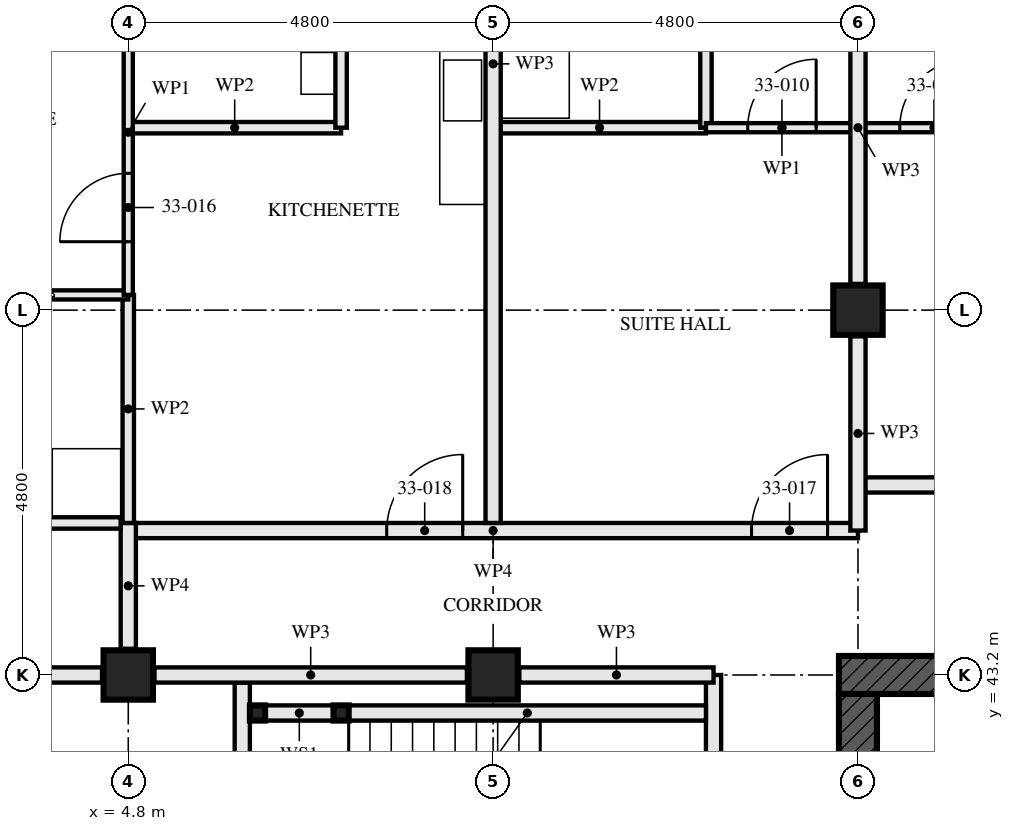
"""IFC4 building model, lengths in metres.
Left out: names, types, materials, properties, quantities, classifications, styles, units other than length and angle.
Written with IfcOpenShell. Run it as: python <this file> out.ifc"""

import sys

from ifc_helpers import new_model, si_unit, direction, frame, frame_2d, origin, origin_2d, place, context, subcontext, project, spatial, rectangle, hollow_rectangle, extrude, element, fill, save


model = new_model("IFC4")
c1 = context("Model", 3, precision=1e-05, world=origin(), true_north=direction((0.0, 1.0)))
c2 = subcontext(c1, "Body", "Model", "MODEL_VIEW")
j1 = project(units=[si_unit("LENGTHUNIT", "METRE"), si_unit("PLANEANGLEUNIT", "RADIAN")], contexts=[c1])
p1 = place(None, origin())
s1 = spatial("IfcSite", under=j1, at=p1, CompositionType="ELEMENT")
p2 = place(p1, origin())
s2 = spatial("IfcBuilding", under=s1, at=p2, CompositionType="ELEMENT")
p3 = place(p2, frame((0.0, 0.0, 122.5)))
s3 = spatial("IfcBuildingStorey", under=s2, at=p3, CompositionType="ELEMENT", Elevation=122.5)
for number, where, z_axis, x_axis in (
    (1, (4.8, 43.2, 0.0), (0.0, 0.0, 1.0), (0.0, 1.0, 0.0)),
    (2, (9.6, 43.2, 0.0), (0.0, 0.0, 1.0), (0.0, 1.0, 0.0)),
    (3, (14.4, 48.0, 0.0), (0.0, 0.0, 1.0), (1.0, 0.0, 0.0)),
):
    element("IfcColumn", number, at=place(p3, frame(where, z_axis=z_axis, x_axis=x_axis)), inside=s3, PredefinedType="COLUMN", context=c2, shape_type="SweptSolid", body=[
        extrude(hollow_rectangle(XDim=0.65, YDim=0.65, WallThickness=0.05, at=origin_2d()), origin(), (0.0, 0.0, 1.0), 3.5),
    ])
p4 = place(p3, frame((29.05, 43.2, -0.17), z_axis=(0.0, 0.0, 1.0), x_axis=(-1.0, 0.0, 0.0)))
e4 = element("IfcWall", 4, at=p4, inside=s3, PredefinedType="SHEAR", context=c2, shape_type="SweptSolid", body=[
    extrude(rectangle(XDim=14.9, YDim=0.5, at=frame_2d((7.45, 0.0))), origin(), (0.0, 0.0, 1.0), 3.5),
])
p5 = place(p4, frame((6.85, 0.0, 0.17)))
e5 = element("IfcOpeningElement", 5, at=p5, cuts=e4, PredefinedType="OPENING", context=c2, shape_type="SweptSolid", body=[
    extrude(rectangle(XDim=1.2, YDim=2.1, at=frame_2d((0.6, 1.05))), frame((0.0, 0.26, 0.0), z_axis=(0.0, -1.0, 0.0), x_axis=(1.0, 0.0, 0.0)), (0.0, 0.0, 1.0), 0.521),
])
p6 = place(p3, frame((14.4, 42.95, -0.17), z_axis=(0.0, 0.0, 1.0), x_axis=(0.0, -1.0, 0.0)))
e6 = element("IfcWall", 6, at=p6, inside=s3, PredefinedType="SHEAR", context=c2, shape_type="SweptSolid", body=[
    extrude(rectangle(XDim=13.9, YDim=0.5, at=frame_2d((6.95, 0.0))), origin(), (0.0, 0.0, 1.0), 3.5),
])
p7 = place(p6, frame((6.35, 0.0, 0.17)))
e7 = element("IfcOpeningElement", 7, at=p7, cuts=e6, PredefinedType="OPENING", context=c2, shape_type="SweptSolid", body=[
    extrude(rectangle(XDim=1.2, YDim=2.1, at=frame_2d((0.6, 1.05))), frame((0.0, 0.26, 0.0), z_axis=(0.0, -1.0, 0.0), x_axis=(1.0, 0.0, 0.0)), (0.0, 0.0, 1.0), 0.521),
])
for number, where, z_axis, x_axis in (
    (8, (6.5, 42.7, 0.0), (0.0, 0.0, 1.0), (1.0, 0.0, 0.0)),
    (9, (7.6, 42.7, 0.0), (0.0, 0.0, 1.0), (1.0, 0.0, 0.0)),
):
    element("IfcColumn", number, at=place(p3, frame(where, z_axis=z_axis, x_axis=x_axis)), inside=s3, PredefinedType="COLUMN", context=c2, shape_type="SweptSolid", body=[
        extrude(hollow_rectangle(XDim=0.2, YDim=0.2, WallThickness=0.008, at=origin_2d()), origin(), (0.0, 0.0, 1.0), 3.33),
    ])
p8 = place(p3, frame((6.6, 42.7, 0.0), z_axis=(0.0, 0.0, 1.0), x_axis=(1.0, 0.0, 0.0)))
e10 = element("IfcWall", 10, at=p8, inside=s3, PredefinedType="SOLIDWALL", context=c2, shape_type="SweptSolid", body=[
    extrude(rectangle(XDim=0.9, YDim=0.2, at=frame_2d((0.45, 0.0))), origin(), (0.0, 0.0, 1.0), 2.99),
])
p9 = place(p3, frame((7.7, 42.7, 0.0), z_axis=(0.0, 0.0, 1.0), x_axis=(1.0, 0.0, 0.0)))
e11 = element("IfcWall", 11, at=p9, inside=s3, PredefinedType="SOLIDWALL", context=c2, shape_type="SweptSolid", body=[
    extrude(rectangle(XDim=4.7, YDim=0.2, at=frame_2d((2.35, 0.0))), origin(), (0.0, 0.0, 1.0), 2.99),
])
p10 = place(p3, frame((6.3, 43.1, 0.0), z_axis=(0.0, 0.0, 1.0), x_axis=(0.0, -1.0, 0.0)))
e12 = element("IfcWall", 12, at=p10, inside=s3, PredefinedType="SOLIDWALL", context=c2, shape_type="SweptSolid", body=[
    extrude(rectangle(XDim=3.3, YDim=0.2, at=frame_2d((1.65, 0.0))), origin(), (0.0, 0.0, 1.0), 3.33),
])
p11 = place(p3, frame((12.5, 43.2, 0.0), z_axis=(0.0, 0.0, 1.0), x_axis=(0.0, -1.0, 0.0)))
e13 = element("IfcWall", 13, at=p11, inside=s3, PredefinedType="PARTITIONING", context=c2, shape_type="SweptSolid", body=[
    extrude(rectangle(XDim=14.84, YDim=0.2, at=frame_2d((7.42, 0.0))), origin(), (0.0, 0.0, 1.0), 2.32),
])
p12 = place(p11, frame((1.4, 0.0, 0.0)))
e14 = element("IfcOpeningElement", 14, at=p12, cuts=e13, PredefinedType="OPENING", context=c2, shape_type="SweptSolid", body=[
    extrude(rectangle(XDim=1.0, YDim=2.1, at=frame_2d((0.5, 1.05))), frame((0.0, 0.111, 0.0), z_axis=(0.0, -1.0, 0.0), x_axis=(1.0, 0.0, 0.0)), (0.0, 0.0, 1.0), 0.221),
])
p13 = place(p11, frame((5.2, 0.0, 0.0)))
e15 = element("IfcOpeningElement", 15, at=p13, cuts=e13, PredefinedType="OPENING", context=c2, shape_type="SweptSolid", body=[
    extrude(rectangle(XDim=1.0, YDim=2.1, at=frame_2d((0.5, 1.05))), frame((0.0, 0.111, 0.0), z_axis=(0.0, -1.0, 0.0), x_axis=(1.0, 0.0, 0.0)), (0.0, 0.0, 1.0), 0.221),
])
p14 = place(p11, frame((13.0, 0.0, 0.0)))
e16 = element("IfcOpeningElement", 16, at=p14, cuts=e13, PredefinedType="OPENING", context=c2, shape_type="SweptSolid", body=[
    extrude(rectangle(XDim=1.0, YDim=2.1, at=frame_2d((0.5, 1.05))), frame((0.0, 0.111, 0.0), z_axis=(0.0, -1.0, 0.0), x_axis=(1.0, 0.0, 0.0)), (0.0, 0.0, 1.0), 0.221),
])
p15 = place(p3, frame((12.4, 53.4, 0.0), z_axis=(0.0, 0.0, 1.0), x_axis=(0.0, -1.0, 0.0)))
e17 = element("IfcWall", 17, at=p15, inside=s3, PredefinedType="PARTITIONING", context=c2, shape_type="SweptSolid", body=[
    extrude(rectangle(XDim=3.0, YDim=0.15, at=frame_2d((1.5, 0.0))), origin(), (0.0, 0.0, 1.0), 2.55),
])
p16 = place(p3, frame((12.4, 50.4, 0.0), z_axis=(0.0, 0.0, 1.0), x_axis=(-1.0, 0.0, 0.0)))
e18 = element("IfcWall", 18, at=p16, inside=s3, PredefinedType="PARTITIONING", context=c2, shape_type="SweptSolid", body=[
    extrude(rectangle(XDim=2.8, YDim=0.15, at=frame_2d((1.4, 0.0))), origin(), (0.0, 0.0, 1.0), 3.33),
])
p17 = place(p3, frame((14.4, 50.4, 0.0), z_axis=(0.0, 0.0, 1.0), x_axis=(-1.0, 0.0, 0.0)))
e19 = element("IfcWall", 19, at=p17, inside=s3, PredefinedType="PARTITIONING", context=c2, shape_type="SweptSolid", body=[
    extrude(rectangle(XDim=2.0, YDim=0.12, at=frame_2d((1.0, 0.0))), origin(), (0.0, 0.0, 1.0), 3.33),
])
p18 = place(p17, frame((0.55, 0.0, 0.0)))
e20 = element("IfcOpeningElement", 20, at=p18, cuts=e19, PredefinedType="OPENING", context=c2, shape_type="SweptSolid", body=[
    extrude(rectangle(XDim=0.9, YDim=2.1, at=frame_2d((0.45, 1.05))), frame((0.0, 0.071, 0.0), z_axis=(0.0, -1.0, 0.0), x_axis=(1.0, 0.0, 0.0)), (0.0, 0.0, 1.0), 0.141),
])
p19 = place(p3, frame((9.6, 57.28, 0.0), z_axis=(0.0, 0.0, 1.0), x_axis=(0.0, -1.0, 0.0)))
e21 = element("IfcWall", 21, at=p19, inside=s3, PredefinedType="PARTITIONING", context=c2, shape_type="SweptSolid", body=[
    extrude(rectangle(XDim=12.08, YDim=0.2, at=frame_2d((6.04, 0.0))), origin(), (0.0, 0.0, 1.0), 2.55),
])
p20 = place(p3, frame((7.6, 53.4, 0.0), z_axis=(0.0, 0.0, 1.0), x_axis=(0.0, -1.0, 0.0)))
e22 = element("IfcWall", 22, at=p20, inside=s3, PredefinedType="PARTITIONING", context=c2, shape_type="SweptSolid", body=[
    extrude(rectangle(XDim=3.0, YDim=0.15, at=frame_2d((1.5, 0.0))), origin(), (0.0, 0.0, 1.0), 2.55),
])
p21 = place(p3, frame((7.6, 50.4, 0.0), z_axis=(0.0, 0.0, 1.0), x_axis=(-1.0, 0.0, 0.0)))
e23 = element("IfcWall", 23, at=p21, inside=s3, PredefinedType="PARTITIONING", context=c2, shape_type="SweptSolid", body=[
    extrude(rectangle(XDim=2.8, YDim=0.15, at=frame_2d((1.4, 0.0))), origin(), (0.0, 0.0, 1.0), 3.33),
])
p22 = place(p3, frame((4.8, 48.2, 0.0), z_axis=(0.0, 0.0, 1.0), x_axis=(0.0, -1.0, 0.0)))
e24 = element("IfcWall", 24, at=p22, inside=s3, PredefinedType="PARTITIONING", context=c2, shape_type="SweptSolid", body=[
    extrude(rectangle(XDim=3.0, YDim=0.15, at=frame_2d((1.5, 0.0))), origin(), (0.0, 0.0, 1.0), 2.55),
])
p23 = place(p3, frame((4.8, 48.2, 0.0), z_axis=(0.0, 0.0, 1.0), x_axis=(-1.0, 0.0, 0.0)))
e25 = element("IfcWall", 25, at=p23, inside=s3, PredefinedType="PARTITIONING", context=c2, shape_type="SweptSolid", body=[
    extrude(rectangle(XDim=4.48, YDim=0.12, at=frame_2d((2.24, 0.0))), origin(), (0.0, 0.0, 1.0), 3.33),
])
p24 = place(p23, frame((1.925, 0.0, 0.0)))
e26 = element("IfcOpeningElement", 26, at=p24, cuts=e25, PredefinedType="OPENING", context=c2, shape_type="SweptSolid", body=[
    extrude(rectangle(XDim=0.95, YDim=2.1, at=frame_2d((0.475, 1.05))), frame((0.0, 0.071, 0.0), z_axis=(0.0, -1.0, 0.0), x_axis=(1.0, 0.0, 0.0)), (0.0, 0.0, 1.0), 0.141),
])
p25 = place(p3, frame((4.8, 52.48, 0.0), z_axis=(0.0, 0.0, 1.0), x_axis=(0.0, -1.0, 0.0)))
e27 = element("IfcWall", 27, at=p25, inside=s3, PredefinedType="PARTITIONING", context=c2, shape_type="SweptSolid", body=[
    extrude(rectangle(XDim=4.28, YDim=0.12, at=frame_2d((2.14, 0.0))), origin(), (0.0, 0.0, 1.0), 3.33),
])
p26 = place(p25, frame((2.68, 0.0, 0.0)))
e28 = element("IfcOpeningElement", 28, at=p26, cuts=e27, PredefinedType="OPENING", context=c2, shape_type="SweptSolid", body=[
    extrude(rectangle(XDim=0.9, YDim=2.1, at=frame_2d((0.45, 1.05))), frame((0.0, 0.071, 0.0), z_axis=(0.0, -1.0, 0.0), x_axis=(1.0, 0.0, 0.0)), (0.0, 0.0, 1.0), 0.141),
])
p27 = place(p3, frame((14.4, 45.1, 0.0), z_axis=(0.0, 0.0, 1.0), x_axis=(-1.0, 0.0, 0.0)))
e29 = element("IfcWall", 29, at=p27, inside=s3, PredefinedType="PARTITIONING", context=c2, shape_type="SweptSolid", body=[
    extrude(rectangle(XDim=9.6, YDim=0.2, at=frame_2d((4.8, 0.0))), origin(), (0.0, 0.0, 1.0), 3.33),
])
p28 = place(p27, frame((0.4, 0.0, 0.0)))
e30 = element("IfcOpeningElement", 30, at=p28, cuts=e29, PredefinedType="OPENING", context=c2, shape_type="SweptSolid", body=[
    extrude(rectangle(XDim=1.0, YDim=2.1, at=frame_2d((0.5, 1.05))), frame((0.0, 0.111, 0.0), z_axis=(0.0, -1.0, 0.0), x_axis=(1.0, 0.0, 0.0)), (0.0, 0.0, 1.0), 0.221),
])
p29 = place(p27, frame((5.2, 0.0, 0.0)))
e31 = element("IfcOpeningElement", 31, at=p29, cuts=e29, PredefinedType="OPENING", context=c2, shape_type="SweptSolid", body=[
    extrude(rectangle(XDim=1.0, YDim=2.1, at=frame_2d((0.5, 1.05))), frame((0.0, 0.111, 0.0), z_axis=(0.0, -1.0, 0.0), x_axis=(1.0, 0.0, 0.0)), (0.0, 0.0, 1.0), 0.221),
])
p30 = place(p3, frame((4.8, 45.2, 0.0), z_axis=(0.0, 0.0, 1.0), x_axis=(0.0, -1.0, 0.0)))
e32 = element("IfcWall", 32, at=p30, inside=s3, PredefinedType="PARTITIONING", context=c2, shape_type="SweptSolid", body=[
    extrude(rectangle(XDim=1.655, YDim=0.2, at=frame_2d((0.828, 0.0))), origin(), (0.0, 0.0, 1.0), 3.33),
])
p31 = place(p3, frame((16.4, 50.4, 0.0), z_axis=(0.0, 0.0, 1.0), x_axis=(-1.0, 0.0, 0.0)))
e33 = element("IfcWall", 33, at=p31, inside=s3, PredefinedType="PARTITIONING", context=c2, shape_type="SweptSolid", body=[
    extrude(rectangle(XDim=2.0, YDim=0.12, at=frame_2d((1.0, 0.0))), origin(), (0.0, 0.0, 1.0), 3.33),
])
p32 = place(p31, frame((0.55, 0.0, 0.0)))
e34 = element("IfcOpeningElement", 34, at=p32, cuts=e33, PredefinedType="OPENING", context=c2, shape_type="SweptSolid", body=[
    extrude(rectangle(XDim=0.9, YDim=2.1, at=frame_2d((0.45, 1.05))), frame((0.0, 0.071, 0.0), z_axis=(0.0, -1.0, 0.0), x_axis=(1.0, 0.0, 0.0)), (0.0, 0.0, 1.0), 0.141),
])
p33 = place(p3, frame((29.24, 45.7, 0.0), z_axis=(0.0, 0.0, 1.0), x_axis=(-1.0, 0.0, 0.0)))
e35 = element("IfcWall", 35, at=p33, inside=s3, PredefinedType="PARTITIONING", context=c2, shape_type="SweptSolid", body=[
    extrude(rectangle(XDim=14.84, YDim=0.2, at=frame_2d((7.42, 0.0))), origin(), (0.0, 0.0, 1.0), 2.32),
])
p34 = place(p33, frame((0.84, 0.0, 0.0)))
e36 = element("IfcOpeningElement", 36, at=p34, cuts=e35, PredefinedType="OPENING", context=c2, shape_type="SweptSolid", body=[
    extrude(rectangle(XDim=1.0, YDim=2.1, at=frame_2d((0.5, 1.05))), frame((0.0, 0.111, 0.0), z_axis=(0.0, -1.0, 0.0), x_axis=(1.0, 0.0, 0.0)), (0.0, 0.0, 1.0), 0.221),
])
p35 = place(p33, frame((5.64, 0.0, 0.0)))
e37 = element("IfcOpeningElement", 37, at=p35, cuts=e35, PredefinedType="OPENING", context=c2, shape_type="SweptSolid", body=[
    extrude(rectangle(XDim=1.0, YDim=2.1, at=frame_2d((0.5, 1.05))), frame((0.0, 0.111, 0.0), z_axis=(0.0, -1.0, 0.0), x_axis=(1.0, 0.0, 0.0)), (0.0, 0.0, 1.0), 0.221),
])
p36 = place(p33, frame((10.44, 0.0, 0.0)))
e38 = element("IfcOpeningElement", 38, at=p36, cuts=e35, PredefinedType="OPENING", context=c2, shape_type="SweptSolid", body=[
    extrude(rectangle(XDim=1.0, YDim=2.1, at=frame_2d((0.5, 1.05))), frame((0.0, 0.111, 0.0), z_axis=(0.0, -1.0, 0.0), x_axis=(1.0, 0.0, 0.0)), (0.0, 0.0, 1.0), 0.221),
])
p37 = place(p3, frame((12.5, 43.2, 0.0), z_axis=(0.0, 0.0, 1.0), x_axis=(-1.0, 0.0, 0.0)))
e39 = element("IfcWall", 39, at=p37, inside=s3, PredefinedType="PARTITIONING", context=c2, shape_type="SweptSolid", body=[
    extrude(rectangle(XDim=2.555, YDim=0.2, at=frame_2d((1.277, 0.0))), origin(), (0.0, 0.0, 1.0), 2.32),
])
p38 = place(p3, frame((9.255, 43.2, 0.0), z_axis=(0.0, 0.0, 1.0), x_axis=(-1.0, 0.0, 0.0)))
e40 = element("IfcWall", 40, at=p38, inside=s3, PredefinedType="PARTITIONING", context=c2, shape_type="SweptSolid", body=[
    extrude(rectangle(XDim=4.11, YDim=0.2, at=frame_2d((2.055, 0.0))), origin(), (0.0, 0.0, 1.0), 2.32),
])
p39 = place(p3, frame((4.455, 43.2, 0.0), z_axis=(0.0, 0.0, 1.0), x_axis=(-1.0, 0.0, 0.0)))
e41 = element("IfcWall", 41, at=p39, inside=s3, PredefinedType="PARTITIONING", context=c2, shape_type="SweptSolid", body=[
    extrude(rectangle(XDim=4.135, YDim=0.2, at=frame_2d((2.067, 0.0))), origin(), (0.0, 0.0, 1.0), 2.32),
])
p40 = place(p3, frame((14.4, 45.1, 0.0), z_axis=(0.0, 0.0, 1.0), x_axis=(0.0, 1.0, 0.0)))
e42 = element("IfcWall", 42, at=p40, inside=s3, PredefinedType="PARTITIONING", context=c2, shape_type="SweptSolid", body=[
    extrude(rectangle(XDim=2.555, YDim=0.2, at=frame_2d((1.277, 0.0))), origin(), (0.0, 0.0, 1.0), 2.32),
])
p41 = place(p3, frame((14.4, 48.345, 0.0), z_axis=(0.0, 0.0, 1.0), x_axis=(0.0, 1.0, 0.0)))
e43 = element("IfcWall", 43, at=p41, inside=s3, PredefinedType="PARTITIONING", context=c2, shape_type="SweptSolid", body=[
    extrude(rectangle(XDim=4.11, YDim=0.2, at=frame_2d((2.055, 0.0))), origin(), (0.0, 0.0, 1.0), 2.32),
])
p42 = place(p3, frame((4.7, 45.2, 0.0), z_axis=(0.0, 0.0, 1.0), x_axis=(-1.0, 0.0, 0.0)))
e44 = element("IfcWall", 44, at=p42, inside=s3, PredefinedType="PARTITIONING", context=c2, shape_type="SweptSolid", body=[
    extrude(rectangle(XDim=5.14, YDim=0.15, at=frame_2d((2.57, 0.0))), origin(), (0.0, 0.0, 1.0), 2.32),
])
p43 = place(p18, frame((0.9, 0.0, 0.0), z_axis=(0.0, 0.0, 1.0), x_axis=(-1.0, 0.0, 0.0)))
e45 = element("IfcDoor", 45, at=p43, inside=s3, OperationType="SINGLE_SWING_LEFT", PredefinedType="DOOR", context=c2, shape_type="SweptSolid", body=[
    extrude(rectangle(XDim=0.9, YDim=2.1, at=frame_2d((0.45, 1.05))), frame((0.0, 0.022, 0.0), z_axis=(0.0, -1.0, 0.0), x_axis=(1.0, 0.0, 0.0)), (0.0, 0.0, 1.0), 0.044),
])
fill(e20, e45)
p44 = place(p26, frame((0.9, 0.0, 0.0), z_axis=(0.0, 0.0, 1.0), x_axis=(-1.0, 0.0, 0.0)))
e46 = element("IfcDoor", 46, at=p44, inside=s3, OperationType="SINGLE_SWING_RIGHT", PredefinedType="DOOR", context=c2, shape_type="SweptSolid", body=[
    extrude(rectangle(XDim=0.9, YDim=2.1, at=frame_2d((0.45, 1.05))), frame((0.0, 0.022, 0.0), z_axis=(0.0, -1.0, 0.0), x_axis=(1.0, 0.0, 0.0)), (0.0, 0.0, 1.0), 0.044),
])
fill(e28, e46)
p45 = place(p28, frame((1.0, 0.0, 0.0), z_axis=(0.0, 0.0, 1.0), x_axis=(-1.0, 0.0, 0.0)))
e47 = element("IfcDoor", 47, at=p45, inside=s3, OperationType="SINGLE_SWING_LEFT", PredefinedType="DOOR", context=c2, shape_type="SweptSolid", body=[
    extrude(rectangle(XDim=1.0, YDim=2.1, at=frame_2d((0.5, 1.05))), frame((0.0, 0.027, 0.0), z_axis=(0.0, -1.0, 0.0), x_axis=(1.0, 0.0, 0.0)), (0.0, 0.0, 1.0), 0.054),
])
fill(e30, e47)
p46 = place(p29, frame((1.0, 0.0, 0.0), z_axis=(0.0, 0.0, 1.0), x_axis=(-1.0, 0.0, 0.0)))
e48 = element("IfcDoor", 48, at=p46, inside=s3, OperationType="SINGLE_SWING_LEFT", PredefinedType="DOOR", context=c2, shape_type="SweptSolid", body=[
    extrude(rectangle(XDim=1.0, YDim=2.1, at=frame_2d((0.5, 1.05))), frame((0.0, 0.027, 0.0), z_axis=(0.0, -1.0, 0.0), x_axis=(1.0, 0.0, 0.0)), (0.0, 0.0, 1.0), 0.054),
])
fill(e31, e48)
p47 = place(p32, frame((0.9, 0.0, 0.0), z_axis=(0.0, 0.0, 1.0), x_axis=(-1.0, 0.0, 0.0)))
e49 = element("IfcDoor", 49, at=p47, inside=s3, OperationType="SINGLE_SWING_LEFT", PredefinedType="DOOR", context=c2, shape_type="SweptSolid", body=[
    extrude(rectangle(XDim=0.9, YDim=2.1, at=frame_2d((0.45, 1.05))), frame((0.0, 0.022, 0.0), z_axis=(0.0, -1.0, 0.0), x_axis=(1.0, 0.0, 0.0)), (0.0, 0.0, 1.0), 0.044),
])
fill(e34, e49)
save(model, sys.argv[1])
